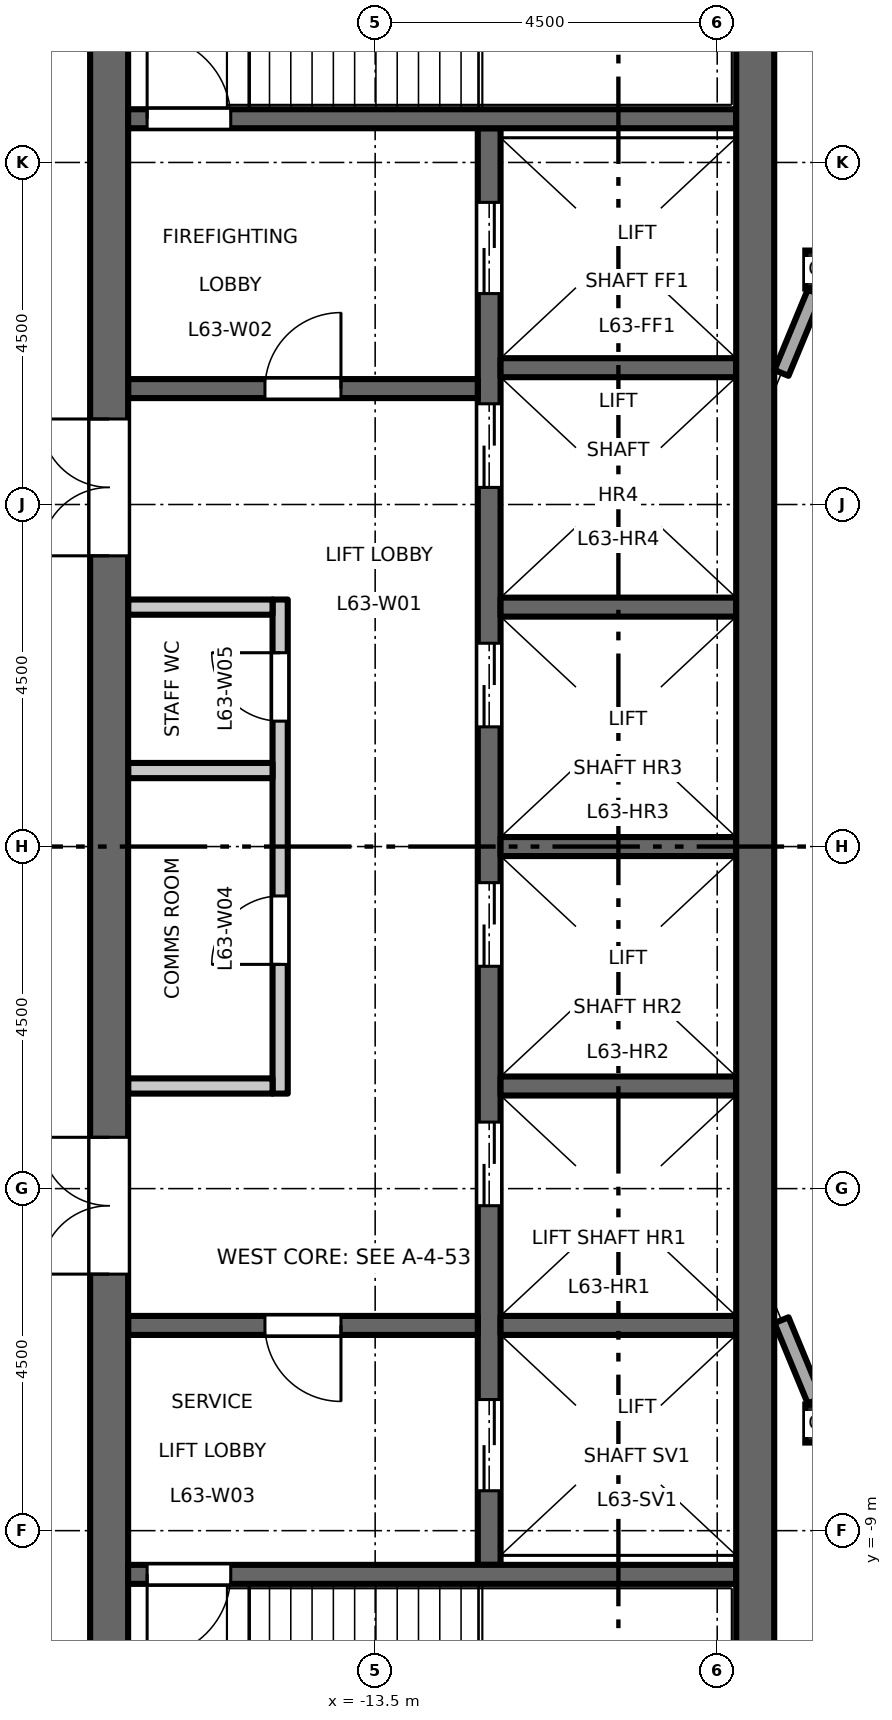
"""IFC4 building model, lengths in metres.
Left out: names, types, materials, properties, quantities, classifications, styles, units other than length and angle.
Written with IfcOpenShell. Run it as: python <this file> out.ifc"""

import sys

from ifc_helpers import new_model, si_unit, direction, frame, frame_2d, origin, origin_2d, place, context, subcontext, project, spatial, rectangle, hollow_rectangle, extrude, element, fill, save


model = new_model("IFC4")
c1 = context("Model", 3, precision=1e-05, world=origin(), true_north=direction((0.0, 1.0)))
c2 = subcontext(c1, "Body", "Model", "MODEL_VIEW")
j1 = project(units=[si_unit("LENGTHUNIT", "METRE"), si_unit("PLANEANGLEUNIT", "RADIAN")], contexts=[c1])
p1 = place(None, origin())
s1 = spatial("IfcSite", under=j1, at=p1, CompositionType="ELEMENT")
p2 = place(p1, origin())
s2 = spatial("IfcBuilding", under=s1, at=p2, CompositionType="ELEMENT")
p3 = place(p2, frame((0.0, 0.0, 294.2)))
s3 = spatial("IfcBuildingStorey", under=s2, at=p3, CompositionType="ELEMENT", Elevation=294.2)
for number, where, z_axis, x_axis in (
    (1, (-7.591, -7.591, 0.0), (0.0, 0.0, 1.0), (1.0, 0.0, 0.0)),
    (2, (-7.591, 7.591, 0.0), (0.0, 0.0, 1.0), (1.0, 0.0, 0.0)),
):
    element("IfcColumn", number, at=place(p3, frame(where, z_axis=z_axis, x_axis=x_axis)), inside=s3, PredefinedType="COLUMN", context=c2, shape_type="SweptSolid", body=[
        extrude(hollow_rectangle(XDim=0.5, YDim=0.5, WallThickness=0.025, at=origin_2d()), origin(), (0.0, 0.0, 1.0), 4.5),
    ])
p4 = place(p3, frame((-14.75, -3.25, 0.0), z_axis=(0.0, 0.0, 1.0), x_axis=(0.0, 1.0, 0.0)))
e3 = element("IfcWall", 3, at=p4, inside=s3, PredefinedType="PARTITIONING", context=c2, shape_type="SweptSolid", body=[
    extrude(rectangle(XDim=6.5, YDim=0.2, at=frame_2d((3.25, 0.0))), origin(), (0.0, 0.0, 1.0), 4.35),
])
p5 = place(p4, frame((1.7, 0.0, 0.0)))
e4 = element("IfcOpeningElement", 4, at=p5, cuts=e3, PredefinedType="OPENING", context=c2, shape_type="SweptSolid", body=[
    extrude(rectangle(XDim=0.9, YDim=2.1, at=frame_2d((0.45, 1.05))), frame((0.0, 0.11, 0.0), z_axis=(0.0, -1.0, 0.0), x_axis=(1.0, 0.0, 0.0)), (0.0, 0.0, 1.0), 0.22),
])
p6 = place(p4, frame((4.9, 0.0, 0.0)))
e5 = element("IfcOpeningElement", 5, at=p6, cuts=e3, PredefinedType="OPENING", context=c2, shape_type="SweptSolid", body=[
    extrude(rectangle(XDim=0.9, YDim=2.1, at=frame_2d((0.45, 1.05))), frame((0.0, 0.11, 0.0), z_axis=(0.0, -1.0, 0.0), x_axis=(1.0, 0.0, 0.0)), (0.0, 0.0, 1.0), 0.22),
])
for number, where, z_axis, x_axis in (
    (6, (-14.85, 3.15, 0.0), (0.0, 0.0, 1.0), (-1.0, 0.0, 0.0)),
    (7, (-14.85, -3.15, 0.0), (0.0, 0.0, 1.0), (-1.0, 0.0, 0.0)),
    (8, (-14.85, 1.0, 0.0), (0.0, 0.0, 1.0), (-1.0, 0.0, 0.0)),
):
    element("IfcWall", number, at=place(p3, frame(where, z_axis=z_axis, x_axis=x_axis)), inside=s3, PredefinedType="PARTITIONING", context=c2, shape_type="SweptSolid", body=[
        extrude(rectangle(XDim=1.9, YDim=0.2, at=frame_2d((0.95, 0.0))), origin(), (0.0, 0.0, 1.0), 4.35),
    ])
p7 = place(p3, frame((-12.0, -9.45, 0.0), z_axis=(0.0, 0.0, 1.0), x_axis=(0.0, 1.0, 0.0)))
e9 = element("IfcWall", 9, at=p7, inside=s3, PredefinedType="SHEAR", context=c2, shape_type="SweptSolid", body=[
    extrude(rectangle(XDim=18.9, YDim=0.3, at=frame_2d((9.45, 0.0))), origin(), (0.0, 0.0, 1.0), 4.35),
])
p8 = place(p7, frame((4.725, 0.0, 0.0)))
e10 = element("IfcOpeningElement", 10, at=p8, cuts=e9, PredefinedType="OPENING", context=c2, shape_type="SweptSolid", body=[
    extrude(rectangle(XDim=1.1, YDim=2.1, at=frame_2d((0.55, 1.05))), frame((0.0, 0.16, 0.0), z_axis=(0.0, -1.0, 0.0), x_axis=(1.0, 0.0, 0.0)), (0.0, 0.0, 1.0), 0.32),
])
p9 = place(p7, frame((7.875, 0.0, 0.0)))
e11 = element("IfcOpeningElement", 11, at=p9, cuts=e9, PredefinedType="OPENING", context=c2, shape_type="SweptSolid", body=[
    extrude(rectangle(XDim=1.1, YDim=2.1, at=frame_2d((0.55, 1.05))), frame((0.0, 0.16, 0.0), z_axis=(0.0, -1.0, 0.0), x_axis=(1.0, 0.0, 0.0)), (0.0, 0.0, 1.0), 0.32),
])
p10 = place(p7, frame((11.025, 0.0, 0.0)))
e12 = element("IfcOpeningElement", 12, at=p10, cuts=e9, PredefinedType="OPENING", context=c2, shape_type="SweptSolid", body=[
    extrude(rectangle(XDim=1.1, YDim=2.1, at=frame_2d((0.55, 1.05))), frame((0.0, 0.16, 0.0), z_axis=(0.0, -1.0, 0.0), x_axis=(1.0, 0.0, 0.0)), (0.0, 0.0, 1.0), 0.32),
])
p11 = place(p7, frame((14.175, 0.0, 0.0)))
e13 = element("IfcOpeningElement", 13, at=p11, cuts=e9, PredefinedType="OPENING", context=c2, shape_type="SweptSolid", body=[
    extrude(rectangle(XDim=1.1, YDim=2.1, at=frame_2d((0.55, 1.05))), frame((0.0, 0.16, 0.0), z_axis=(0.0, -1.0, 0.0), x_axis=(1.0, 0.0, 0.0)), (0.0, 0.0, 1.0), 0.32),
])
p12 = place(p7, frame((16.725, 0.0, 0.0)))
e14 = element("IfcOpeningElement", 14, at=p12, cuts=e9, PredefinedType="OPENING", context=c2, shape_type="SweptSolid", body=[
    extrude(rectangle(XDim=1.2, YDim=2.1, at=frame_2d((0.6, 1.05))), frame((0.0, 0.16, 0.0), z_axis=(0.0, -1.0, 0.0), x_axis=(1.0, 0.0, 0.0)), (0.0, 0.0, 1.0), 0.32),
])
p13 = place(p7, frame((0.975, 0.0, 0.0)))
e15 = element("IfcOpeningElement", 15, at=p13, cuts=e9, PredefinedType="OPENING", context=c2, shape_type="SweptSolid", body=[
    extrude(rectangle(XDim=1.2, YDim=2.1, at=frame_2d((0.6, 1.05))), frame((0.0, 0.16, 0.0), z_axis=(0.0, -1.0, 0.0), x_axis=(1.0, 0.0, 0.0)), (0.0, 0.0, 1.0), 0.32),
])
p14 = place(p3, frame((-12.15, 6.025, 0.0), z_axis=(0.0, 0.0, 1.0), x_axis=(-1.0, 0.0, 0.0)))
e16 = element("IfcWall", 16, at=p14, inside=s3, PredefinedType="SHEAR", context=c2, shape_type="SweptSolid", body=[
    extrude(rectangle(XDim=4.6, YDim=0.25, at=frame_2d((2.3, 0.0))), origin(), (0.0, 0.0, 1.0), 4.35),
])
p15 = place(p14, frame((1.8, 0.0, 0.0)))
e17 = element("IfcOpeningElement", 17, at=p15, cuts=e16, PredefinedType="OPENING", context=c2, shape_type="SweptSolid", body=[
    extrude(rectangle(XDim=1.0, YDim=2.1, at=frame_2d((0.5, 1.05))), frame((0.0, 0.135, 0.0), z_axis=(0.0, -1.0, 0.0), x_axis=(1.0, 0.0, 0.0)), (0.0, 0.0, 1.0), 0.27),
])
p16 = place(p3, frame((-12.15, -6.3, 0.0), z_axis=(0.0, 0.0, 1.0), x_axis=(-1.0, 0.0, 0.0)))
e18 = element("IfcWall", 18, at=p16, inside=s3, PredefinedType="SHEAR", context=c2, shape_type="SweptSolid", body=[
    extrude(rectangle(XDim=4.6, YDim=0.25, at=frame_2d((2.3, 0.0))), origin(), (0.0, 0.0, 1.0), 4.35),
])
p17 = place(p16, frame((1.8, 0.0, 0.0)))
e19 = element("IfcOpeningElement", 19, at=p17, cuts=e18, PredefinedType="OPENING", context=c2, shape_type="SweptSolid", body=[
    extrude(rectangle(XDim=1.0, YDim=2.1, at=frame_2d((0.5, 1.05))), frame((0.0, 0.135, 0.0), z_axis=(0.0, -1.0, 0.0), x_axis=(1.0, 0.0, 0.0)), (0.0, 0.0, 1.0), 0.27),
])
p18 = place(p3, frame((-17.0, -13.0, 0.0), z_axis=(0.0, 0.0, 1.0), x_axis=(0.0, 1.0, 0.0)))
e20 = element("IfcWall", 20, at=p18, inside=s3, PredefinedType="SHEAR", context=c2, shape_type="SweptSolid", body=[
    extrude(rectangle(XDim=26.0, YDim=0.5, at=frame_2d((13.0, 0.0))), origin(), (0.0, 0.0, 1.0), 4.35),
])
p19 = place(p18, frame((16.825, 0.0, 0.0)))
e21 = element("IfcOpeningElement", 21, at=p19, cuts=e20, PredefinedType="OPENING", context=c2, shape_type="SweptSolid", body=[
    extrude(rectangle(XDim=1.8, YDim=2.1, at=frame_2d((0.9, 1.05))), frame((0.0, 0.26, 0.0), z_axis=(0.0, -1.0, 0.0), x_axis=(1.0, 0.0, 0.0)), (0.0, 0.0, 1.0), 0.52),
])
p20 = place(p18, frame((7.375, 0.0, 0.0)))
e22 = element("IfcOpeningElement", 22, at=p20, cuts=e20, PredefinedType="OPENING", context=c2, shape_type="SweptSolid", body=[
    extrude(rectangle(XDim=1.8, YDim=2.1, at=frame_2d((0.9, 1.05))), frame((0.0, 0.26, 0.0), z_axis=(0.0, -1.0, 0.0), x_axis=(1.0, 0.0, 0.0)), (0.0, 0.0, 1.0), 0.52),
])
for number, where, z_axis, x_axis in (
    (23, (-8.75, 0.0, 0.0), (0.0, 0.0, 1.0), (-1.0, 0.0, 0.0)),
    (24, (-8.75, 3.15, 0.0), (0.0, 0.0, 1.0), (-1.0, 0.0, 0.0)),
    (25, (-8.75, 6.3, 0.0), (0.0, 0.0, 1.0), (-1.0, 0.0, 0.0)),
    (26, (-8.75, -3.15, 0.0), (0.0, 0.0, 1.0), (-1.0, 0.0, 0.0)),
    (27, (-8.75, -6.3, 0.0), (0.0, 0.0, 1.0), (-1.0, 0.0, 0.0)),
):
    element("IfcWall", number, at=place(p3, frame(where, z_axis=z_axis, x_axis=x_axis)), inside=s3, PredefinedType="SHEAR", context=c2, shape_type="SweptSolid", body=[
        extrude(rectangle(XDim=3.1, YDim=0.25, at=frame_2d((1.55, 0.0))), origin(), (0.0, 0.0, 1.0), 4.35),
    ])
p21 = place(p3, frame((-8.75, 9.575, 0.0), z_axis=(0.0, 0.0, 1.0), x_axis=(-1.0, 0.0, 0.0)))
e28 = element("IfcWall", 28, at=p21, inside=s3, PredefinedType="SHEAR", context=c2, shape_type="SweptSolid", body=[
    extrude(rectangle(XDim=8.0, YDim=0.25, at=frame_2d((4.0, 0.0))), origin(), (0.0, 0.0, 1.0), 4.35),
])
p22 = place(p21, frame((6.65, 0.0, 0.0)))
e29 = element("IfcOpeningElement", 29, at=p22, cuts=e28, PredefinedType="OPENING", context=c2, shape_type="SweptSolid", body=[
    extrude(rectangle(XDim=1.1, YDim=2.1, at=frame_2d((0.55, 1.05))), frame((0.0, 0.135, 0.0), z_axis=(0.0, -1.0, 0.0), x_axis=(1.0, 0.0, 0.0)), (0.0, 0.0, 1.0), 0.27),
])
p23 = place(p3, frame((-8.75, -9.575, 0.0), z_axis=(0.0, 0.0, 1.0), x_axis=(-1.0, 0.0, 0.0)))
e30 = element("IfcWall", 30, at=p23, inside=s3, PredefinedType="SHEAR", context=c2, shape_type="SweptSolid", body=[
    extrude(rectangle(XDim=8.0, YDim=0.25, at=frame_2d((4.0, 0.0))), origin(), (0.0, 0.0, 1.0), 4.35),
])
p24 = place(p23, frame((6.65, 0.0, 0.0)))
e31 = element("IfcOpeningElement", 31, at=p24, cuts=e30, PredefinedType="OPENING", context=c2, shape_type="SweptSolid", body=[
    extrude(rectangle(XDim=1.1, YDim=2.1, at=frame_2d((0.55, 1.05))), frame((0.0, 0.135, 0.0), z_axis=(0.0, -1.0, 0.0), x_axis=(1.0, 0.0, 0.0)), (0.0, 0.0, 1.0), 0.27),
])
p25 = place(p3, frame((-8.5, -13.0, 0.0), z_axis=(0.0, 0.0, 1.0), x_axis=(0.0, 1.0, 0.0)))
e32 = element("IfcWall", 32, at=p25, inside=s3, PredefinedType="SHEAR", context=c2, shape_type="SweptSolid", body=[
    extrude(rectangle(XDim=26.0, YDim=0.5, at=frame_2d((13.0, 0.0))), origin(), (0.0, 0.0, 1.0), 4.35),
])
for number, where, z_axis, x_axis in (
    (33, (-7.716, 7.289, 0.0), (0.0, 0.0, 1.0), (-0.383, -0.924, 0.0)),
    (34, (-8.154, -6.231, 0.0), (0.0, 0.0, 1.0), (0.383, -0.924, 0.0)),
):
    element("IfcWall", number, at=place(p3, frame(where, z_axis=z_axis, x_axis=x_axis)), inside=s3, PredefinedType="STANDARD", context=c2, shape_type="SweptSolid", body=[
        extrude(rectangle(XDim=1.146, YDim=0.2, at=frame_2d((0.573, 0.0))), origin(), (0.0, 0.0, 1.0), 4.01),
    ])
p26 = place(p15, origin())
e35 = element("IfcDoor", 35, at=p26, inside=s3, OperationType="SINGLE_SWING_LEFT", PredefinedType="DOOR", context=c2, shape_type="SweptSolid", body=[
    extrude(rectangle(XDim=1.0, YDim=2.1, at=frame_2d((0.5, 1.05))), frame((0.0, 0.025, 0.0), z_axis=(0.0, -1.0, 0.0), x_axis=(1.0, 0.0, 0.0)), (0.0, 0.0, 1.0), 0.05),
])
fill(e17, e35)
p27 = place(p17, origin())
e36 = element("IfcDoor", 36, at=p27, inside=s3, OperationType="SINGLE_SWING_RIGHT", PredefinedType="DOOR", context=c2, shape_type="SweptSolid", body=[
    extrude(rectangle(XDim=1.0, YDim=2.1, at=frame_2d((0.5, 1.05))), frame((0.0, 0.025, 0.0), z_axis=(0.0, -1.0, 0.0), x_axis=(1.0, 0.0, 0.0)), (0.0, 0.0, 1.0), 0.05),
])
fill(e19, e36)
p28 = place(p22, origin())
e37 = element("IfcDoor", 37, at=p28, inside=s3, OperationType="SINGLE_SWING_RIGHT", PredefinedType="DOOR", context=c2, shape_type="SweptSolid", body=[
    extrude(rectangle(XDim=1.1, YDim=2.1, at=frame_2d((0.55, 1.05))), frame((0.0, 0.025, 0.0), z_axis=(0.0, -1.0, 0.0), x_axis=(1.0, 0.0, 0.0)), (0.0, 0.0, 1.0), 0.05),
])
fill(e29, e37)
p29 = place(p24, origin())
e38 = element("IfcDoor", 38, at=p29, inside=s3, OperationType="SINGLE_SWING_LEFT", PredefinedType="DOOR", context=c2, shape_type="SweptSolid", body=[
    extrude(rectangle(XDim=1.1, YDim=2.1, at=frame_2d((0.55, 1.05))), frame((0.0, 0.025, 0.0), z_axis=(0.0, -1.0, 0.0), x_axis=(1.0, 0.0, 0.0)), (0.0, 0.0, 1.0), 0.05),
])
fill(e31, e38)
p30 = place(p19, origin())
e39 = element("IfcDoor", 39, at=p30, inside=s3, OperationType="DOUBLE_DOOR_DOUBLE_SWING", PredefinedType="DOOR", context=c2, shape_type="SweptSolid", body=[
    extrude(rectangle(XDim=1.8, YDim=2.1, at=frame_2d((0.9, 1.05))), frame((0.0, 0.025, 0.0), z_axis=(0.0, -1.0, 0.0), x_axis=(1.0, 0.0, 0.0)), (0.0, 0.0, 1.0), 0.05),
])
fill(e21, e39)
p31 = place(p20, origin())
e40 = element("IfcDoor", 40, at=p31, inside=s3, OperationType="DOUBLE_DOOR_DOUBLE_SWING", PredefinedType="DOOR", context=c2, shape_type="SweptSolid", body=[
    extrude(rectangle(XDim=1.8, YDim=2.1, at=frame_2d((0.9, 1.05))), frame((0.0, 0.025, 0.0), z_axis=(0.0, -1.0, 0.0), x_axis=(1.0, 0.0, 0.0)), (0.0, 0.0, 1.0), 0.05),
])
fill(e22, e40)
p32 = place(p8, origin())
e41 = element("IfcDoor", 41, at=p32, inside=s3, OperationType="DOUBLE_DOOR_SLIDING", PredefinedType="DOOR", context=c2, shape_type="SweptSolid", body=[
    extrude(rectangle(XDim=1.1, YDim=2.1, at=frame_2d((0.55, 1.05))), frame((0.0, 0.025, 0.0), z_axis=(0.0, -1.0, 0.0), x_axis=(1.0, 0.0, 0.0)), (0.0, 0.0, 1.0), 0.05),
])
fill(e10, e41)
p33 = place(p9, origin())
e42 = element("IfcDoor", 42, at=p33, inside=s3, OperationType="DOUBLE_DOOR_SLIDING", PredefinedType="DOOR", context=c2, shape_type="SweptSolid", body=[
    extrude(rectangle(XDim=1.1, YDim=2.1, at=frame_2d((0.55, 1.05))), frame((0.0, 0.025, 0.0), z_axis=(0.0, -1.0, 0.0), x_axis=(1.0, 0.0, 0.0)), (0.0, 0.0, 1.0), 0.05),
])
fill(e11, e42)
p34 = place(p10, origin())
e43 = element("IfcDoor", 43, at=p34, inside=s3, OperationType="DOUBLE_DOOR_SLIDING", PredefinedType="DOOR", context=c2, shape_type="SweptSolid", body=[
    extrude(rectangle(XDim=1.1, YDim=2.1, at=frame_2d((0.55, 1.05))), frame((0.0, 0.025, 0.0), z_axis=(0.0, -1.0, 0.0), x_axis=(1.0, 0.0, 0.0)), (0.0, 0.0, 1.0), 0.05),
])
fill(e12, e43)
p35 = place(p11, origin())
e44 = element("IfcDoor", 44, at=p35, inside=s3, OperationType="DOUBLE_DOOR_SLIDING", PredefinedType="DOOR", context=c2, shape_type="SweptSolid", body=[
    extrude(rectangle(XDim=1.1, YDim=2.1, at=frame_2d((0.55, 1.05))), frame((0.0, 0.025, 0.0), z_axis=(0.0, -1.0, 0.0), x_axis=(1.0, 0.0, 0.0)), (0.0, 0.0, 1.0), 0.05),
])
fill(e13, e44)
p36 = place(p12, origin())
e45 = element("IfcDoor", 45, at=p36, inside=s3, OperationType="DOUBLE_DOOR_SLIDING", PredefinedType="DOOR", context=c2, shape_type="SweptSolid", body=[
    extrude(rectangle(XDim=1.2, YDim=2.1, at=frame_2d((0.6, 1.05))), frame((0.0, 0.025, 0.0), z_axis=(0.0, -1.0, 0.0), x_axis=(1.0, 0.0, 0.0)), (0.0, 0.0, 1.0), 0.05),
])
fill(e14, e45)
p37 = place(p13, origin())
e46 = element("IfcDoor", 46, at=p37, inside=s3, OperationType="DOUBLE_DOOR_SLIDING", PredefinedType="DOOR", context=c2, shape_type="SweptSolid", body=[
    extrude(rectangle(XDim=1.2, YDim=2.1, at=frame_2d((0.6, 1.05))), frame((0.0, 0.025, 0.0), z_axis=(0.0, -1.0, 0.0), x_axis=(1.0, 0.0, 0.0)), (0.0, 0.0, 1.0), 0.05),
])
fill(e15, e46)
p38 = place(p5, origin())
e47 = element("IfcDoor", 47, at=p38, inside=s3, OperationType="SINGLE_SWING_RIGHT", PredefinedType="DOOR", context=c2, shape_type="SweptSolid", body=[
    extrude(rectangle(XDim=0.9, YDim=2.1, at=frame_2d((0.45, 1.05))), frame((0.0, 0.025, 0.0), z_axis=(0.0, -1.0, 0.0), x_axis=(1.0, 0.0, 0.0)), (0.0, 0.0, 1.0), 0.05),
])
fill(e4, e47)
p39 = place(p6, origin())
e48 = element("IfcDoor", 48, at=p39, inside=s3, OperationType="SINGLE_SWING_LEFT", PredefinedType="DOOR", context=c2, shape_type="SweptSolid", body=[
    extrude(rectangle(XDim=0.9, YDim=2.1, at=frame_2d((0.45, 1.05))), frame((0.0, 0.025, 0.0), z_axis=(0.0, -1.0, 0.0), x_axis=(1.0, 0.0, 0.0)), (0.0, 0.0, 1.0), 0.05),
])
fill(e5, e48)
save(model, sys.argv[1])
